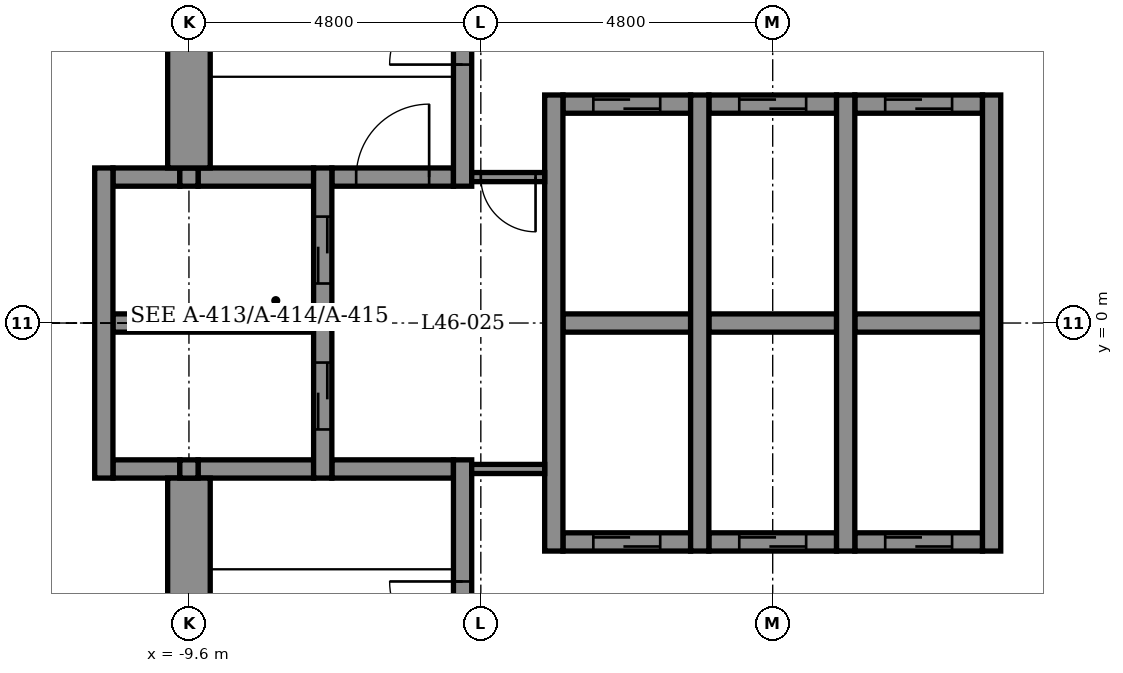
"""IFC4 building model, lengths in metres.
Left out: names, types, materials, properties, quantities, classifications, styles, units other than length and angle.
Written with IfcOpenShell. Run it as: python <this file> out.ifc"""

import sys

from ifc_helpers import new_model, si_unit, direction, frame, frame_2d, origin, place, context, subcontext, project, spatial, rectangle, extrude, element, fill, save


model = new_model("IFC4")
c1 = context("Model", 3, precision=1e-05, world=origin(), true_north=direction((0.0, 1.0)))
c2 = subcontext(c1, "Body", "Model", "MODEL_VIEW")
j1 = project(units=[si_unit("LENGTHUNIT", "METRE"), si_unit("PLANEANGLEUNIT", "RADIAN")], contexts=[c1])
p1 = place(None, origin())
s1 = spatial("IfcSite", under=j1, at=p1, CompositionType="ELEMENT")
p2 = place(p1, origin())
s2 = spatial("IfcBuilding", under=s1, at=p2, CompositionType="ELEMENT")
p3 = place(p2, frame((0.0, 0.0, 212.9)))
s3 = spatial("IfcBuildingStorey", under=s2, at=p3, CompositionType="ELEMENT", Elevation=212.9)
p4 = place(p3, frame((-3.45, -3.6, -0.15), z_axis=(0.0, 0.0, 1.0), x_axis=(1.0, 0.0, 0.0)))
e1 = element("IfcWall", 1, at=p4, inside=s3, PredefinedType="STANDARD", context=c2, shape_type="SweptSolid", body=[
    extrude(rectangle(XDim=2.1, YDim=0.3, at=frame_2d((1.05, 0.0))), origin(), (0.0, 0.0, 1.0), 3.75),
])
p5 = place(p4, frame((0.5, 0.0, 0.15)))
e2 = element("IfcOpeningElement", 2, at=p5, cuts=e1, PredefinedType="OPENING", context=c2, shape_type="SweptSolid", body=[
    extrude(rectangle(XDim=1.1, YDim=2.1, at=frame_2d((0.55, 1.05))), frame((0.0, 0.16, 0.0), z_axis=(0.0, -1.0, 0.0), x_axis=(1.0, 0.0, 0.0)), (0.0, 0.0, 1.0), 0.32),
])
p6 = place(p3, frame((-1.05, -3.6, -0.15), z_axis=(0.0, 0.0, 1.0), x_axis=(1.0, 0.0, 0.0)))
e3 = element("IfcWall", 3, at=p6, inside=s3, PredefinedType="STANDARD", context=c2, shape_type="SweptSolid", body=[
    extrude(rectangle(XDim=2.1, YDim=0.3, at=frame_2d((1.05, 0.0))), origin(), (0.0, 0.0, 1.0), 3.75),
])
p7 = place(p6, frame((0.5, 0.0, 0.15)))
e4 = element("IfcOpeningElement", 4, at=p7, cuts=e3, PredefinedType="OPENING", context=c2, shape_type="SweptSolid", body=[
    extrude(rectangle(XDim=1.1, YDim=2.1, at=frame_2d((0.55, 1.05))), frame((0.0, 0.16, 0.0), z_axis=(0.0, -1.0, 0.0), x_axis=(1.0, 0.0, 0.0)), (0.0, 0.0, 1.0), 0.32),
])
p8 = place(p3, frame((1.35, -3.6, -0.15), z_axis=(0.0, 0.0, 1.0), x_axis=(1.0, 0.0, 0.0)))
e5 = element("IfcWall", 5, at=p8, inside=s3, PredefinedType="STANDARD", context=c2, shape_type="SweptSolid", body=[
    extrude(rectangle(XDim=2.1, YDim=0.3, at=frame_2d((1.05, 0.0))), origin(), (0.0, 0.0, 1.0), 3.75),
])
p9 = place(p8, frame((0.5, 0.0, 0.15)))
e6 = element("IfcOpeningElement", 6, at=p9, cuts=e5, PredefinedType="OPENING", context=c2, shape_type="SweptSolid", body=[
    extrude(rectangle(XDim=1.1, YDim=2.1, at=frame_2d((0.55, 1.05))), frame((0.0, 0.16, 0.0), z_axis=(0.0, -1.0, 0.0), x_axis=(1.0, 0.0, 0.0)), (0.0, 0.0, 1.0), 0.32),
])
p10 = place(p3, frame((-10.85, -2.4, -0.15), z_axis=(0.0, 0.0, 1.0), x_axis=(1.0, 0.0, 0.0)))
e7 = element("IfcWall", 7, at=p10, inside=s3, PredefinedType="STANDARD", context=c2, shape_type="SweptSolid", body=[
    extrude(rectangle(XDim=1.1, YDim=0.3, at=frame_2d((0.55, 0.0))), origin(), (0.0, 0.0, 1.0), 3.75),
])
p11 = place(p3, frame((-9.45, -2.4, -0.15), z_axis=(0.0, 0.0, 1.0), x_axis=(1.0, 0.0, 0.0)))
e8 = element("IfcWall", 8, at=p11, inside=s3, PredefinedType="STANDARD", context=c2, shape_type="SweptSolid", body=[
    extrude(rectangle(XDim=1.9, YDim=0.3, at=frame_2d((0.95, 0.0))), origin(), (0.0, 0.0, 1.0), 3.75),
])
p12 = place(p3, frame((-7.25, -2.4, -0.15), z_axis=(0.0, 0.0, 1.0), x_axis=(1.0, 0.0, 0.0)))
e9 = element("IfcWall", 9, at=p12, inside=s3, PredefinedType="STANDARD", context=c2, shape_type="SweptSolid", body=[
    extrude(rectangle(XDim=2.0, YDim=0.3, at=frame_2d((1.0, 0.0))), origin(), (0.0, 0.0, 1.0), 3.75),
])
p13 = place(p3, frame((-10.85, 0.0, -0.15), z_axis=(0.0, 0.0, 1.0), x_axis=(1.0, 0.0, 0.0)))
e10 = element("IfcWall", 10, at=p13, inside=s3, PredefinedType="STANDARD", context=c2, shape_type="SweptSolid", body=[
    extrude(rectangle(XDim=3.3, YDim=0.3, at=frame_2d((1.65, 0.0))), origin(), (0.0, 0.0, 1.0), 3.75),
])
p14 = place(p3, frame((-3.45, 0.0, -0.15), z_axis=(0.0, 0.0, 1.0), x_axis=(1.0, 0.0, 0.0)))
e11 = element("IfcWall", 11, at=p14, inside=s3, PredefinedType="STANDARD", context=c2, shape_type="SweptSolid", body=[
    extrude(rectangle(XDim=2.1, YDim=0.3, at=frame_2d((1.05, 0.0))), origin(), (0.0, 0.0, 1.0), 3.75),
])
p15 = place(p3, frame((-1.05, 0.0, -0.15), z_axis=(0.0, 0.0, 1.0), x_axis=(1.0, 0.0, 0.0)))
e12 = element("IfcWall", 12, at=p15, inside=s3, PredefinedType="STANDARD", context=c2, shape_type="SweptSolid", body=[
    extrude(rectangle(XDim=2.1, YDim=0.3, at=frame_2d((1.05, 0.0))), origin(), (0.0, 0.0, 1.0), 3.75),
])
p16 = place(p3, frame((1.35, 0.0, -0.15), z_axis=(0.0, 0.0, 1.0), x_axis=(1.0, 0.0, 0.0)))
e13 = element("IfcWall", 13, at=p16, inside=s3, PredefinedType="STANDARD", context=c2, shape_type="SweptSolid", body=[
    extrude(rectangle(XDim=2.1, YDim=0.3, at=frame_2d((1.05, 0.0))), origin(), (0.0, 0.0, 1.0), 3.75),
])
p17 = place(p3, frame((-10.85, 2.4, -0.15), z_axis=(0.0, 0.0, 1.0), x_axis=(1.0, 0.0, 0.0)))
e14 = element("IfcWall", 14, at=p17, inside=s3, PredefinedType="STANDARD", context=c2, shape_type="SweptSolid", body=[
    extrude(rectangle(XDim=1.1, YDim=0.3, at=frame_2d((0.55, 0.0))), origin(), (0.0, 0.0, 1.0), 3.75),
])
p18 = place(p3, frame((-9.45, 2.4, -0.15), z_axis=(0.0, 0.0, 1.0), x_axis=(1.0, 0.0, 0.0)))
e15 = element("IfcWall", 15, at=p18, inside=s3, PredefinedType="STANDARD", context=c2, shape_type="SweptSolid", body=[
    extrude(rectangle(XDim=1.9, YDim=0.3, at=frame_2d((0.95, 0.0))), origin(), (0.0, 0.0, 1.0), 3.75),
])
p19 = place(p3, frame((-7.25, 2.4, -0.15), z_axis=(0.0, 0.0, 1.0), x_axis=(1.0, 0.0, 0.0)))
e16 = element("IfcWall", 16, at=p19, inside=s3, PredefinedType="STANDARD", context=c2, shape_type="SweptSolid", body=[
    extrude(rectangle(XDim=2.0, YDim=0.3, at=frame_2d((1.0, 0.0))), origin(), (0.0, 0.0, 1.0), 3.75),
])
p20 = place(p19, frame((0.4, 0.0, 0.15)))
e17 = element("IfcOpeningElement", 17, at=p20, cuts=e16, PredefinedType="OPENING", context=c2, shape_type="SweptSolid", body=[
    extrude(rectangle(XDim=1.2, YDim=2.1, at=frame_2d((0.6, 1.05))), frame((0.0, 0.16, 0.0), z_axis=(0.0, -1.0, 0.0), x_axis=(1.0, 0.0, 0.0)), (0.0, 0.0, 1.0), 0.32),
])
p21 = place(p3, frame((-3.45, 3.6, -0.15), z_axis=(0.0, 0.0, 1.0), x_axis=(1.0, 0.0, 0.0)))
e18 = element("IfcWall", 18, at=p21, inside=s3, PredefinedType="STANDARD", context=c2, shape_type="SweptSolid", body=[
    extrude(rectangle(XDim=2.1, YDim=0.3, at=frame_2d((1.05, 0.0))), origin(), (0.0, 0.0, 1.0), 3.75),
])
p22 = place(p21, frame((0.5, 0.0, 0.15)))
e19 = element("IfcOpeningElement", 19, at=p22, cuts=e18, PredefinedType="OPENING", context=c2, shape_type="SweptSolid", body=[
    extrude(rectangle(XDim=1.1, YDim=2.1, at=frame_2d((0.55, 1.05))), frame((0.0, 0.16, 0.0), z_axis=(0.0, -1.0, 0.0), x_axis=(1.0, 0.0, 0.0)), (0.0, 0.0, 1.0), 0.32),
])
p23 = place(p3, frame((-1.05, 3.6, -0.15), z_axis=(0.0, 0.0, 1.0), x_axis=(1.0, 0.0, 0.0)))
e20 = element("IfcWall", 20, at=p23, inside=s3, PredefinedType="STANDARD", context=c2, shape_type="SweptSolid", body=[
    extrude(rectangle(XDim=2.1, YDim=0.3, at=frame_2d((1.05, 0.0))), origin(), (0.0, 0.0, 1.0), 3.75),
])
p24 = place(p23, frame((0.5, 0.0, 0.15)))
e21 = element("IfcOpeningElement", 21, at=p24, cuts=e20, PredefinedType="OPENING", context=c2, shape_type="SweptSolid", body=[
    extrude(rectangle(XDim=1.1, YDim=2.1, at=frame_2d((0.55, 1.05))), frame((0.0, 0.16, 0.0), z_axis=(0.0, -1.0, 0.0), x_axis=(1.0, 0.0, 0.0)), (0.0, 0.0, 1.0), 0.32),
])
p25 = place(p3, frame((1.35, 3.6, -0.15), z_axis=(0.0, 0.0, 1.0), x_axis=(1.0, 0.0, 0.0)))
e22 = element("IfcWall", 22, at=p25, inside=s3, PredefinedType="STANDARD", context=c2, shape_type="SweptSolid", body=[
    extrude(rectangle(XDim=2.1, YDim=0.3, at=frame_2d((1.05, 0.0))), origin(), (0.0, 0.0, 1.0), 3.75),
])
p26 = place(p25, frame((0.5, 0.0, 0.15)))
e23 = element("IfcOpeningElement", 23, at=p26, cuts=e22, PredefinedType="OPENING", context=c2, shape_type="SweptSolid", body=[
    extrude(rectangle(XDim=1.1, YDim=2.1, at=frame_2d((0.55, 1.05))), frame((0.0, 0.16, 0.0), z_axis=(0.0, -1.0, 0.0), x_axis=(1.0, 0.0, 0.0)), (0.0, 0.0, 1.0), 0.32),
])
p27 = place(p3, frame((-11.0, -2.55, -0.15), z_axis=(0.0, 0.0, 1.0), x_axis=(0.0, 1.0, 0.0)))
e24 = element("IfcWall", 24, at=p27, inside=s3, PredefinedType="STANDARD", context=c2, shape_type="SweptSolid", body=[
    extrude(rectangle(XDim=5.1, YDim=0.3, at=frame_2d((2.55, 0.0))), origin(), (0.0, 0.0, 1.0), 3.75),
])
p28 = place(p3, frame((-9.6, -10.15, -0.15), z_axis=(0.0, 0.0, 1.0), x_axis=(0.0, 1.0, 0.0)))
e25 = element("IfcWall", 25, at=p28, inside=s3, PredefinedType="SHEAR", context=c2, shape_type="SweptSolid", body=[
    extrude(rectangle(XDim=7.6, YDim=0.7, at=frame_2d((3.8, 0.0))), origin(), (0.0, 0.0, 1.0), 3.75),
])
for number, where, z_axis, x_axis in (
    (26, (-9.6, -2.55, -0.15), (0.0, 0.0, 1.0), (0.0, 1.0, 0.0)),
    (27, (-9.6, 2.25, -0.15), (0.0, 0.0, 1.0), (0.0, 1.0, 0.0)),
):
    element("IfcWall", number, at=place(p3, frame(where, z_axis=z_axis, x_axis=x_axis)), inside=s3, PredefinedType="STANDARD", context=c2, shape_type="SweptSolid", body=[
        extrude(rectangle(XDim=0.3, YDim=0.3, at=frame_2d((0.15, 0.0))), origin(), (0.0, 0.0, 1.0), 3.75),
    ])
p29 = place(p3, frame((-9.6, 2.55, -0.15), z_axis=(0.0, 0.0, 1.0), x_axis=(0.0, 1.0, 0.0)))
e28 = element("IfcWall", 28, at=p29, inside=s3, PredefinedType="SHEAR", context=c2, shape_type="SweptSolid", body=[
    extrude(rectangle(XDim=7.6, YDim=0.7, at=frame_2d((3.8, 0.0))), origin(), (0.0, 0.0, 1.0), 3.75),
])
p30 = place(p3, frame((-7.4, -2.55, -0.15), z_axis=(0.0, 0.0, 1.0), x_axis=(0.0, 1.0, 0.0)))
e29 = element("IfcWall", 29, at=p30, inside=s3, PredefinedType="STANDARD", context=c2, shape_type="SweptSolid", body=[
    extrude(rectangle(XDim=5.1, YDim=0.3, at=frame_2d((2.55, 0.0))), origin(), (0.0, 0.0, 1.0), 3.75),
])
p31 = place(p30, frame((0.8, 0.0, 0.15)))
e30 = element("IfcOpeningElement", 30, at=p31, cuts=e29, PredefinedType="OPENING", context=c2, shape_type="SweptSolid", body=[
    extrude(rectangle(XDim=1.1, YDim=2.1, at=frame_2d((0.55, 1.05))), frame((0.0, 0.16, 0.0), z_axis=(0.0, -1.0, 0.0), x_axis=(1.0, 0.0, 0.0)), (0.0, 0.0, 1.0), 0.32),
])
p32 = place(p30, frame((3.2, 0.0, 0.15)))
e31 = element("IfcOpeningElement", 31, at=p32, cuts=e29, PredefinedType="OPENING", context=c2, shape_type="SweptSolid", body=[
    extrude(rectangle(XDim=1.1, YDim=2.1, at=frame_2d((0.55, 1.05))), frame((0.0, 0.16, 0.0), z_axis=(0.0, -1.0, 0.0), x_axis=(1.0, 0.0, 0.0)), (0.0, 0.0, 1.0), 0.32),
])
p33 = place(p3, frame((-5.1, -9.25, -0.15), z_axis=(0.0, 0.0, 1.0), x_axis=(0.0, 1.0, 0.0)))
e32 = element("IfcWall", 32, at=p33, inside=s3, PredefinedType="STANDARD", context=c2, shape_type="SweptSolid", body=[
    extrude(rectangle(XDim=7.0, YDim=0.3, at=frame_2d((3.5, 0.0))), origin(), (0.0, 0.0, 1.0), 3.75),
])
p34 = place(p33, frame((3.8, 0.0, 0.15)))
e33 = element("IfcOpeningElement", 33, at=p34, cuts=e32, PredefinedType="OPENING", context=c2, shape_type="SweptSolid", body=[
    extrude(rectangle(XDim=1.2, YDim=2.1, at=frame_2d((0.6, 1.05))), frame((0.0, 0.16, 0.0), z_axis=(0.0, -1.0, 0.0), x_axis=(1.0, 0.0, 0.0)), (0.0, 0.0, 1.0), 0.32),
])
p35 = place(p3, frame((-5.1, 2.25, -0.15), z_axis=(0.0, 0.0, 1.0), x_axis=(0.0, 1.0, 0.0)))
e34 = element("IfcWall", 34, at=p35, inside=s3, PredefinedType="STANDARD", context=c2, shape_type="SweptSolid", body=[
    extrude(rectangle(XDim=7.0, YDim=0.3, at=frame_2d((3.5, 0.0))), origin(), (0.0, 0.0, 1.0), 3.75),
])
p36 = place(p35, frame((2.0, 0.0, 0.15)))
e35 = element("IfcOpeningElement", 35, at=p36, cuts=e34, PredefinedType="OPENING", context=c2, shape_type="SweptSolid", body=[
    extrude(rectangle(XDim=1.2, YDim=2.1, at=frame_2d((0.6, 1.05))), frame((0.0, 0.16, 0.0), z_axis=(0.0, -1.0, 0.0), x_axis=(1.0, 0.0, 0.0)), (0.0, 0.0, 1.0), 0.32),
])
for number, where, z_axis, x_axis in (
    (36, (-3.6, -3.75, -0.15), (0.0, 0.0, 1.0), (0.0, 1.0, 0.0)),
    (37, (-1.2, -3.75, -0.15), (0.0, 0.0, 1.0), (0.0, 1.0, 0.0)),
    (38, (1.2, -3.75, -0.15), (0.0, 0.0, 1.0), (0.0, 1.0, 0.0)),
    (39, (3.6, -3.75, -0.15), (0.0, 0.0, 1.0), (0.0, 1.0, 0.0)),
):
    element("IfcWall", number, at=place(p3, frame(where, z_axis=z_axis, x_axis=x_axis)), inside=s3, PredefinedType="STANDARD", context=c2, shape_type="SweptSolid", body=[
        extrude(rectangle(XDim=7.5, YDim=0.3, at=frame_2d((3.75, 0.0))), origin(), (0.0, 0.0, 1.0), 3.75),
    ])
p37 = place(p3, frame((-4.95, 2.4, 0.0), z_axis=(0.0, 0.0, 1.0), x_axis=(1.0, 0.0, 0.0)))
e40 = element("IfcWall", 40, at=p37, inside=s3, PredefinedType="PARTITIONING", context=c2, shape_type="SweptSolid", body=[
    extrude(rectangle(XDim=1.2, YDim=0.15, at=frame_2d((0.6, 0.0))), origin(), (0.0, 0.0, 1.0), 3.6),
])
p38 = place(p37, frame((0.15, 0.0, 0.0)))
e41 = element("IfcOpeningElement", 41, at=p38, cuts=e40, PredefinedType="OPENING", context=c2, shape_type="SweptSolid", body=[
    extrude(rectangle(XDim=0.9, YDim=2.1, at=frame_2d((0.45, 1.05))), frame((0.0, 0.085, 0.0), z_axis=(0.0, -1.0, 0.0), x_axis=(1.0, 0.0, 0.0)), (0.0, 0.0, 1.0), 0.17),
])
p39 = place(p3, frame((-4.95, -2.4, 0.0), z_axis=(0.0, 0.0, 1.0), x_axis=(1.0, 0.0, 0.0)))
e42 = element("IfcWall", 42, at=p39, inside=s3, PredefinedType="PARTITIONING", context=c2, shape_type="SweptSolid", body=[
    extrude(rectangle(XDim=1.2, YDim=0.15, at=frame_2d((0.6, 0.0))), origin(), (0.0, 0.0, 1.0), 3.6),
])
p40 = place(p31, origin())
e43 = element("IfcDoor", 43, at=p40, inside=s3, OperationType="DOUBLE_DOOR_SLIDING", PredefinedType="DOOR", context=c2, shape_type="SweptSolid", body=[
    extrude(rectangle(XDim=1.1, YDim=2.1, at=frame_2d((0.55, 1.05))), frame((0.0, 0.025, 0.0), z_axis=(0.0, -1.0, 0.0), x_axis=(1.0, 0.0, 0.0)), (0.0, 0.0, 1.0), 0.05),
])
fill(e30, e43)
p41 = place(p32, origin())
e44 = element("IfcDoor", 44, at=p41, inside=s3, OperationType="DOUBLE_DOOR_SLIDING", PredefinedType="DOOR", context=c2, shape_type="SweptSolid", body=[
    extrude(rectangle(XDim=1.1, YDim=2.1, at=frame_2d((0.55, 1.05))), frame((0.0, 0.025, 0.0), z_axis=(0.0, -1.0, 0.0), x_axis=(1.0, 0.0, 0.0)), (0.0, 0.0, 1.0), 0.05),
])
fill(e31, e44)
p42 = place(p22, origin())
e45 = element("IfcDoor", 45, at=p42, inside=s3, OperationType="DOUBLE_DOOR_SLIDING", PredefinedType="DOOR", context=c2, shape_type="SweptSolid", body=[
    extrude(rectangle(XDim=1.1, YDim=2.1, at=frame_2d((0.55, 1.05))), frame((0.0, 0.025, 0.0), z_axis=(0.0, -1.0, 0.0), x_axis=(1.0, 0.0, 0.0)), (0.0, 0.0, 1.0), 0.05),
])
fill(e19, e45)
p43 = place(p24, origin())
e46 = element("IfcDoor", 46, at=p43, inside=s3, OperationType="DOUBLE_DOOR_SLIDING", PredefinedType="DOOR", context=c2, shape_type="SweptSolid", body=[
    extrude(rectangle(XDim=1.1, YDim=2.1, at=frame_2d((0.55, 1.05))), frame((0.0, 0.025, 0.0), z_axis=(0.0, -1.0, 0.0), x_axis=(1.0, 0.0, 0.0)), (0.0, 0.0, 1.0), 0.05),
])
fill(e21, e46)
p44 = place(p26, origin())
e47 = element("IfcDoor", 47, at=p44, inside=s3, OperationType="DOUBLE_DOOR_SLIDING", PredefinedType="DOOR", context=c2, shape_type="SweptSolid", body=[
    extrude(rectangle(XDim=1.1, YDim=2.1, at=frame_2d((0.55, 1.05))), frame((0.0, 0.025, 0.0), z_axis=(0.0, -1.0, 0.0), x_axis=(1.0, 0.0, 0.0)), (0.0, 0.0, 1.0), 0.05),
])
fill(e23, e47)
p45 = place(p5, origin())
e48 = element("IfcDoor", 48, at=p45, inside=s3, OperationType="DOUBLE_DOOR_SLIDING", PredefinedType="DOOR", context=c2, shape_type="SweptSolid", body=[
    extrude(rectangle(XDim=1.1, YDim=2.1, at=frame_2d((0.55, 1.05))), frame((0.0, 0.025, 0.0), z_axis=(0.0, -1.0, 0.0), x_axis=(1.0, 0.0, 0.0)), (0.0, 0.0, 1.0), 0.05),
])
fill(e2, e48)
p46 = place(p7, origin())
e49 = element("IfcDoor", 49, at=p46, inside=s3, OperationType="DOUBLE_DOOR_SLIDING", PredefinedType="DOOR", context=c2, shape_type="SweptSolid", body=[
    extrude(rectangle(XDim=1.1, YDim=2.1, at=frame_2d((0.55, 1.05))), frame((0.0, 0.025, 0.0), z_axis=(0.0, -1.0, 0.0), x_axis=(1.0, 0.0, 0.0)), (0.0, 0.0, 1.0), 0.05),
])
fill(e4, e49)
p47 = place(p9, origin())
e50 = element("IfcDoor", 50, at=p47, inside=s3, OperationType="DOUBLE_DOOR_SLIDING", PredefinedType="DOOR", context=c2, shape_type="SweptSolid", body=[
    extrude(rectangle(XDim=1.1, YDim=2.1, at=frame_2d((0.55, 1.05))), frame((0.0, 0.025, 0.0), z_axis=(0.0, -1.0, 0.0), x_axis=(1.0, 0.0, 0.0)), (0.0, 0.0, 1.0), 0.05),
])
fill(e6, e50)
p48 = place(p36, origin())
e51 = element("IfcDoor", 51, at=p48, inside=s3, OperationType="SINGLE_SWING_LEFT", PredefinedType="DOOR", context=c2, shape_type="SweptSolid", body=[
    extrude(rectangle(XDim=1.2, YDim=2.1, at=frame_2d((0.6, 1.05))), frame((0.0, 0.025, 0.0), z_axis=(0.0, -1.0, 0.0), x_axis=(1.0, 0.0, 0.0)), (0.0, 0.0, 1.0), 0.05),
])
fill(e35, e51)
p49 = place(p34, origin())
e52 = element("IfcDoor", 52, at=p49, inside=s3, OperationType="SINGLE_SWING_RIGHT", PredefinedType="DOOR", context=c2, shape_type="SweptSolid", body=[
    extrude(rectangle(XDim=1.2, YDim=2.1, at=frame_2d((0.6, 1.05))), frame((0.0, 0.025, 0.0), z_axis=(0.0, -1.0, 0.0), x_axis=(1.0, 0.0, 0.0)), (0.0, 0.0, 1.0), 0.05),
])
fill(e33, e52)
p50 = place(p38, frame((0.9, 0.0, 0.0), z_axis=(0.0, 0.0, 1.0), x_axis=(-1.0, 0.0, 0.0)))
e53 = element("IfcDoor", 53, at=p50, inside=s3, OperationType="SINGLE_SWING_RIGHT", PredefinedType="DOOR", context=c2, shape_type="SweptSolid", body=[
    extrude(rectangle(XDim=0.9, YDim=2.1, at=frame_2d((0.45, 1.05))), frame((0.0, 0.025, 0.0), z_axis=(0.0, -1.0, 0.0), x_axis=(1.0, 0.0, 0.0)), (0.0, 0.0, 1.0), 0.05),
])
fill(e41, e53)
p51 = place(p20, origin())
e54 = element("IfcDoor", 54, at=p51, inside=s3, OperationType="SINGLE_SWING_RIGHT", PredefinedType="DOOR", context=c2, shape_type="SweptSolid", body=[
    extrude(rectangle(XDim=1.2, YDim=2.1, at=frame_2d((0.6, 1.05))), frame((0.0, 0.025, 0.0), z_axis=(0.0, -1.0, 0.0), x_axis=(1.0, 0.0, 0.0)), (0.0, 0.0, 1.0), 0.05),
])
fill(e17, e54)
save(model, sys.argv[1])
